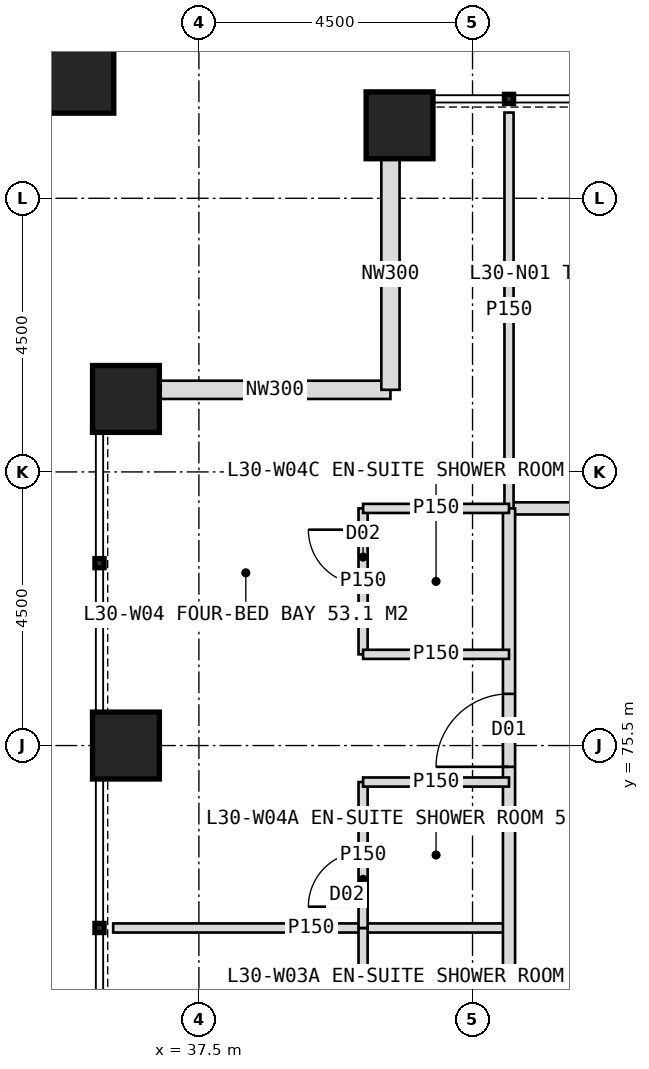
"""IFC4 building model, lengths in metres.
Left out: names, types, materials, properties, quantities, classifications, styles, units other than length and angle.
Written with IfcOpenShell. Run it as: python <this file> out.ifc"""

import sys

from ifc_helpers import new_model, si_unit, direction, frame, frame_2d, origin, origin_2d, place, context, subcontext, project, spatial, rectangle, hollow_rectangle, extrude, element, fill, save


model = new_model("IFC4")
c1 = context("Model", 3, precision=1e-05, world=origin(), true_north=direction((0.0, 1.0)))
c2 = subcontext(c1, "Body", "Model", "MODEL_VIEW")
j1 = project(units=[si_unit("LENGTHUNIT", "METRE"), si_unit("PLANEANGLEUNIT", "RADIAN")], contexts=[c1])
p1 = place(None, origin())
s1 = spatial("IfcSite", under=j1, at=p1, CompositionType="ELEMENT")
p2 = place(p1, origin())
s2 = spatial("IfcBuilding", under=s1, at=p2, CompositionType="ELEMENT")
p3 = place(p2, frame((0.0, 0.0, 128.0)))
s3 = spatial("IfcBuildingStorey", under=s2, at=p3, CompositionType="ELEMENT", Elevation=128.0)
for number, where, z_axis, x_axis in (
    (1, (40.8, 85.7, 0.0), (0.0, 0.0, 1.0), (1.0, 0.0, 0.0)),
    (2, (36.3, 75.5, 0.0), (0.0, 0.0, 1.0), (1.0, 0.0, 0.0)),
    (3, (36.3, 81.2, 0.0), (0.0, 0.0, 1.0), (1.0, 0.0, 0.0)),
):
    element("IfcColumn", number, at=place(p3, frame(where, z_axis=z_axis, x_axis=x_axis)), inside=s3, PredefinedType="COLUMN", context=c2, shape_type="SweptSolid", body=[
        extrude(hollow_rectangle(XDim=1.1, YDim=1.1, WallThickness=0.1, at=origin_2d()), origin(), (0.0, 0.0, 1.0), 4.0),
    ])
p4 = place(p3, frame((35.4, 86.6, 0.0), z_axis=(0.0, 0.0, 1.0), x_axis=(1.0, 0.0, 0.0)))
e4 = element("IfcColumn", 4, at=p4, inside=s3, PredefinedType="COLUMN", context=c2, shape_type="SweptSolid", body=[
    extrude(hollow_rectangle(XDim=1.4, YDim=1.4, WallThickness=0.08, at=origin_2d()), origin(), (0.0, 0.0, 1.0), 4.0),
])
for number, where, z_axis, x_axis in (
    (5, (36.85, 81.35, 0.0), (0.0, 0.0, 1.0), (1.0, 0.0, 0.0)),
    (6, (40.65, 81.35, 0.0), (0.0, 0.0, 1.0), (0.0, 1.0, 0.0)),
):
    element("IfcWall", number, at=place(p3, frame(where, z_axis=z_axis, x_axis=x_axis)), inside=s3, PredefinedType="ELEMENTEDWALL", context=c2, shape_type="SweptSolid", body=[
        extrude(rectangle(XDim=3.8, YDim=0.3, at=frame_2d((1.9, 0.0))), origin(), (0.0, 0.0, 1.0), 4.0),
    ])
p5 = place(p3, frame((42.6, 79.4, 0.0), z_axis=(0.0, 0.0, 1.0), x_axis=(1.0, 0.0, 0.0)))
e7 = element("IfcWall", 7, at=p5, inside=s3, PredefinedType="PARTITIONING", context=c2, shape_type="SweptSolid", body=[
    extrude(rectangle(XDim=34.8, YDim=0.2, at=frame_2d((17.4, 0.0))), origin(), (0.0, 0.0, 1.0), 3.75),
])
p6 = place(p5, frame((2.45, 0.0, 0.0)))
e8 = element("IfcOpeningElement", 8, at=p6, cuts=e7, PredefinedType="OPENING", context=c2, shape_type="SweptSolid", body=[
    extrude(rectangle(XDim=1.2, YDim=2.2, at=frame_2d((0.6, 1.1))), frame((0.0, 0.11, 0.0), z_axis=(0.0, -1.0, 0.0), x_axis=(1.0, 0.0, 0.0)), (0.0, 0.0, 1.0), 0.22),
])
p7 = place(p5, frame((10.15, 0.0, 0.0)))
e9 = element("IfcOpeningElement", 9, at=p7, cuts=e7, PredefinedType="OPENING", context=c2, shape_type="SweptSolid", body=[
    extrude(rectangle(XDim=1.2, YDim=2.2, at=frame_2d((0.6, 1.1))), frame((0.0, 0.11, 0.0), z_axis=(0.0, -1.0, 0.0), x_axis=(1.0, 0.0, 0.0)), (0.0, 0.0, 1.0), 0.22),
])
p8 = place(p5, frame((19.8, 0.0, 0.0)))
e10 = element("IfcOpeningElement", 10, at=p8, cuts=e7, PredefinedType="OPENING", context=c2, shape_type="SweptSolid", body=[
    extrude(rectangle(XDim=1.2, YDim=2.2, at=frame_2d((0.6, 1.1))), frame((0.0, 0.11, 0.0), z_axis=(0.0, -1.0, 0.0), x_axis=(1.0, 0.0, 0.0)), (0.0, 0.0, 1.0), 0.22),
])
p9 = place(p5, frame((27.55, 0.0, 0.0)))
e11 = element("IfcOpeningElement", 11, at=p9, cuts=e7, PredefinedType="OPENING", context=c2, shape_type="SweptSolid", body=[
    extrude(rectangle(XDim=1.2, YDim=2.2, at=frame_2d((0.6, 1.1))), frame((0.0, 0.11, 0.0), z_axis=(0.0, -1.0, 0.0), x_axis=(1.0, 0.0, 0.0)), (0.0, 0.0, 1.0), 0.22),
])
for number, where, z_axis, x_axis in (
    (12, (42.6, 79.4, 0.0), (0.0, 0.0, 1.0), (0.0, 1.0, 0.0)),
    (13, (42.6, 72.5, 0.0), (0.0, 0.0, 1.0), (-1.0, 0.0, 0.0)),
):
    element("IfcWall", number, at=place(p3, frame(where, z_axis=z_axis, x_axis=x_axis)), inside=s3, PredefinedType="PARTITIONING", context=c2, shape_type="SweptSolid", body=[
        extrude(rectangle(XDim=6.51, YDim=0.15, at=frame_2d((3.255, 0.0))), origin(), (0.0, 0.0, 1.0), 3.75),
    ])
p10 = place(p3, frame((42.6, 44.6, 0.0), z_axis=(0.0, 0.0, 1.0), x_axis=(0.0, 1.0, 0.0)))
e14 = element("IfcWall", 14, at=p10, inside=s3, PredefinedType="PARTITIONING", context=c2, shape_type="SweptSolid", body=[
    extrude(rectangle(XDim=34.8, YDim=0.2, at=frame_2d((17.4, 0.0))), origin(), (0.0, 0.0, 1.0), 3.75),
])
p11 = place(p10, frame((2.45, 0.0, 0.0)))
e15 = element("IfcOpeningElement", 15, at=p11, cuts=e14, PredefinedType="OPENING", context=c2, shape_type="SweptSolid", body=[
    extrude(rectangle(XDim=1.2, YDim=2.2, at=frame_2d((0.6, 1.1))), frame((0.0, 0.11, 0.0), z_axis=(0.0, -1.0, 0.0), x_axis=(1.0, 0.0, 0.0)), (0.0, 0.0, 1.0), 0.22),
])
p12 = place(p10, frame((10.15, 0.0, 0.0)))
e16 = element("IfcOpeningElement", 16, at=p12, cuts=e14, PredefinedType="OPENING", context=c2, shape_type="SweptSolid", body=[
    extrude(rectangle(XDim=1.2, YDim=2.2, at=frame_2d((0.6, 1.1))), frame((0.0, 0.11, 0.0), z_axis=(0.0, -1.0, 0.0), x_axis=(1.0, 0.0, 0.0)), (0.0, 0.0, 1.0), 0.22),
])
p13 = place(p10, frame((23.45, 0.0, 0.0)))
e17 = element("IfcOpeningElement", 17, at=p13, cuts=e14, PredefinedType="OPENING", context=c2, shape_type="SweptSolid", body=[
    extrude(rectangle(XDim=1.2, YDim=2.2, at=frame_2d((0.6, 1.1))), frame((0.0, 0.11, 0.0), z_axis=(0.0, -1.0, 0.0), x_axis=(1.0, 0.0, 0.0)), (0.0, 0.0, 1.0), 0.22),
])
p14 = place(p10, frame((30.55, 0.0, 0.0)))
e18 = element("IfcOpeningElement", 18, at=p14, cuts=e14, PredefinedType="OPENING", context=c2, shape_type="SweptSolid", body=[
    extrude(rectangle(XDim=1.2, YDim=2.2, at=frame_2d((0.6, 1.1))), frame((0.0, 0.11, 0.0), z_axis=(0.0, -1.0, 0.0), x_axis=(1.0, 0.0, 0.0)), (0.0, 0.0, 1.0), 0.22),
])
p15 = place(p3, frame((40.2, 69.5, 0.0), z_axis=(0.0, 0.0, 1.0), x_axis=(0.0, 1.0, 0.0)))
e19 = element("IfcWall", 19, at=p15, inside=s3, PredefinedType="PARTITIONING", context=c2, shape_type="SweptSolid", body=[
    extrude(rectangle(XDim=3.0, YDim=0.15, at=frame_2d((1.5, 0.0))), origin(), (0.0, 0.0, 1.0), 3.75),
])
p16 = place(p15, frame((0.35, 0.0, 0.0)))
e20 = element("IfcOpeningElement", 20, at=p16, cuts=e19, PredefinedType="OPENING", context=c2, shape_type="SweptSolid", body=[
    extrude(rectangle(XDim=0.9, YDim=2.1, at=frame_2d((0.45, 1.05))), frame((0.0, 0.085, 0.0), z_axis=(0.0, -1.0, 0.0), x_axis=(1.0, 0.0, 0.0)), (0.0, 0.0, 1.0), 0.17),
])
p17 = place(p3, frame((40.2, 72.5, 0.0), z_axis=(0.0, 0.0, 1.0), x_axis=(0.0, 1.0, 0.0)))
e21 = element("IfcWall", 21, at=p17, inside=s3, PredefinedType="PARTITIONING", context=c2, shape_type="SweptSolid", body=[
    extrude(rectangle(XDim=2.4, YDim=0.15, at=frame_2d((1.2, 0.0))), origin(), (0.0, 0.0, 1.0), 3.75),
])
p18 = place(p17, frame((0.35, 0.0, 0.0)))
e22 = element("IfcOpeningElement", 22, at=p18, cuts=e21, PredefinedType="OPENING", context=c2, shape_type="SweptSolid", body=[
    extrude(rectangle(XDim=0.9, YDim=2.1, at=frame_2d((0.45, 1.05))), frame((0.0, 0.085, 0.0), z_axis=(0.0, -1.0, 0.0), x_axis=(1.0, 0.0, 0.0)), (0.0, 0.0, 1.0), 0.17),
])
p19 = place(p3, frame((42.6, 74.9, 0.0), z_axis=(0.0, 0.0, 1.0), x_axis=(-1.0, 0.0, 0.0)))
e23 = element("IfcWall", 23, at=p19, inside=s3, PredefinedType="PARTITIONING", context=c2, shape_type="SweptSolid", body=[
    extrude(rectangle(XDim=2.4, YDim=0.15, at=frame_2d((1.2, 0.0))), origin(), (0.0, 0.0, 1.0), 3.75),
])
p20 = place(p3, frame((40.2, 77.0, 0.0), z_axis=(0.0, 0.0, 1.0), x_axis=(0.0, 1.0, 0.0)))
e24 = element("IfcWall", 24, at=p20, inside=s3, PredefinedType="PARTITIONING", context=c2, shape_type="SweptSolid", body=[
    extrude(rectangle(XDim=2.4, YDim=0.15, at=frame_2d((1.2, 0.0))), origin(), (0.0, 0.0, 1.0), 3.75),
])
p21 = place(p20, frame((1.15, 0.0, 0.0)))
e25 = element("IfcOpeningElement", 25, at=p21, cuts=e24, PredefinedType="OPENING", context=c2, shape_type="SweptSolid", body=[
    extrude(rectangle(XDim=0.9, YDim=2.1, at=frame_2d((0.45, 1.05))), frame((0.0, 0.085, 0.0), z_axis=(0.0, -1.0, 0.0), x_axis=(1.0, 0.0, 0.0)), (0.0, 0.0, 1.0), 0.17),
])
for number, where, z_axis, x_axis in (
    (26, (42.6, 77.0, 0.0), (0.0, 0.0, 1.0), (-1.0, 0.0, 0.0)),
    (27, (42.6, 79.4, 0.0), (0.0, 0.0, 1.0), (-1.0, 0.0, 0.0)),
):
    element("IfcWall", number, at=place(p3, frame(where, z_axis=z_axis, x_axis=x_axis)), inside=s3, PredefinedType="PARTITIONING", context=c2, shape_type="SweptSolid", body=[
        extrude(rectangle(XDim=2.4, YDim=0.15, at=frame_2d((1.2, 0.0))), origin(), (0.0, 0.0, 1.0), 3.75),
    ])
p22 = place(p14, origin())
e28 = element("IfcDoor", 28, at=p22, inside=s3, OperationType="SINGLE_SWING_LEFT", PredefinedType="DOOR", context=c2, shape_type="SweptSolid", body=[
    extrude(rectangle(XDim=1.2, YDim=2.2, at=frame_2d((0.6, 1.1))), frame((0.0, 0.025, 0.0), z_axis=(0.0, -1.0, 0.0), x_axis=(1.0, 0.0, 0.0)), (0.0, 0.0, 1.0), 0.05),
])
fill(e18, e28)
p23 = place(p18, origin())
e29 = element("IfcDoor", 29, at=p23, inside=s3, OperationType="SINGLE_SWING_LEFT", PredefinedType="DOOR", context=c2, shape_type="SweptSolid", body=[
    extrude(rectangle(XDim=0.9, YDim=2.1, at=frame_2d((0.45, 1.05))), frame((0.0, 0.025, 0.0), z_axis=(0.0, -1.0, 0.0), x_axis=(1.0, 0.0, 0.0)), (0.0, 0.0, 1.0), 0.05),
])
fill(e22, e29)
p24 = place(p21, origin())
e30 = element("IfcDoor", 30, at=p24, inside=s3, OperationType="SINGLE_SWING_RIGHT", PredefinedType="DOOR", context=c2, shape_type="SweptSolid", body=[
    extrude(rectangle(XDim=0.9, YDim=2.1, at=frame_2d((0.45, 1.05))), frame((0.0, 0.025, 0.0), z_axis=(0.0, -1.0, 0.0), x_axis=(1.0, 0.0, 0.0)), (0.0, 0.0, 1.0), 0.05),
])
fill(e25, e30)
save(model, sys.argv[1])
